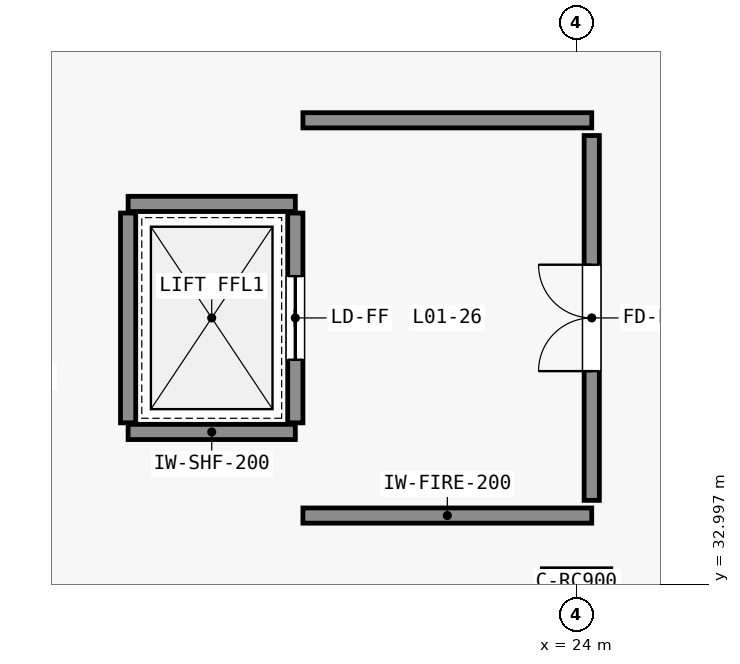
"""IFC4 building model, lengths in metres.
Left out: names, types, materials, properties, quantities, classifications, styles, units other than length and angle.
Written with IfcOpenShell. Run it as: python <this file> out.ifc"""

import sys

from ifc_helpers import new_model, si_unit, direction, frame, frame_2d, origin, origin_2d, place, context, subcontext, project, spatial, rectangle, extrude, element, fill, save


model = new_model("IFC4")
c1 = context("Model", 3, precision=1e-05, world=origin(), true_north=direction((0.0, 1.0)))
c2 = subcontext(c1, "Body", "Model", "MODEL_VIEW")
j1 = project(units=[si_unit("LENGTHUNIT", "METRE"), si_unit("PLANEANGLEUNIT", "RADIAN")], contexts=[c1])
p1 = place(None, origin())
s1 = spatial("IfcSite", under=j1, at=p1, CompositionType="ELEMENT")
p2 = place(p1, origin())
s2 = spatial("IfcBuilding", under=s1, at=p2, CompositionType="ELEMENT")
p3 = place(p2, frame((0.0, 0.0, 6.0)))
s3 = spatial("IfcBuildingStorey", under=s2, at=p3, CompositionType="ELEMENT", Elevation=6.0)
p4 = place(p3, frame((24.0, 32.6, 0.0), z_axis=(0.0, 0.0, 1.0), x_axis=(1.0, 0.0, 0.0)))
e1 = element("IfcColumn", 1, at=p4, inside=s3, PredefinedType="COLUMN", context=c2, shape_type="SweptSolid", body=[
    extrude(rectangle(XDim=0.9, YDim=1.2, at=origin_2d()), origin(), (0.0, 0.0, 1.0), 5.4),
])
for number, where, z_axis, x_axis in (
    (2, (18.1, 35.0, 0.0), (0.0, 0.0, 1.0), (1.0, 0.0, 0.0)),
    (3, (18.1, 38.0, 0.0), (0.0, 0.0, 1.0), (1.0, 0.0, 0.0)),
):
    element("IfcWall", number, at=place(p3, frame(where, z_axis=z_axis, x_axis=x_axis)), inside=s3, PredefinedType="STANDARD", context=c2, shape_type="SweptSolid", body=[
        extrude(rectangle(XDim=2.2, YDim=0.2, at=frame_2d((1.1, 0.0))), origin(), (0.0, 0.0, 1.0), 5.04),
    ])
p5 = place(p3, frame((18.1, 35.12, 0.0), z_axis=(0.0, 0.0, 1.0), x_axis=(0.0, 1.0, 0.0)))
e4 = element("IfcWall", 4, at=p5, inside=s3, PredefinedType="STANDARD", context=c2, shape_type="SweptSolid", body=[
    extrude(rectangle(XDim=2.76, YDim=0.2, at=frame_2d((1.38, 0.0))), origin(), (0.0, 0.0, 1.0), 5.04),
])
p6 = place(p3, frame((20.3, 35.12, 0.0), z_axis=(0.0, 0.0, 1.0), x_axis=(0.0, 1.0, 0.0)))
e5 = element("IfcWall", 5, at=p6, inside=s3, PredefinedType="STANDARD", context=c2, shape_type="SweptSolid", body=[
    extrude(rectangle(XDim=2.76, YDim=0.2, at=frame_2d((1.38, 0.0))), origin(), (0.0, 0.0, 1.0), 5.04),
])
p7 = place(p6, frame((0.83, 0.0, 0.0)))
e6 = element("IfcOpeningElement", 6, at=p7, cuts=e5, PredefinedType="OPENING", context=c2, shape_type="SweptSolid", body=[
    extrude(rectangle(XDim=1.1, YDim=2.15, at=frame_2d((0.55, 1.075))), frame((0.0, 0.11, 0.0), z_axis=(0.0, -1.0, 0.0), x_axis=(1.0, 0.0, 0.0)), (0.0, 0.0, 1.0), 0.22),
])
p8 = place(p3, frame((20.4, 33.9, 0.0), z_axis=(0.0, 0.0, 1.0), x_axis=(1.0, 0.0, 0.0)))
e7 = element("IfcWall", 7, at=p8, inside=s3, PredefinedType="STANDARD", context=c2, shape_type="SweptSolid", body=[
    extrude(rectangle(XDim=3.8, YDim=0.2, at=frame_2d((1.9, 0.0))), origin(), (0.0, 0.0, 1.0), 4.19),
])
p9 = place(p3, frame((20.4, 39.1, 0.0), z_axis=(0.0, 0.0, 1.0), x_axis=(1.0, 0.0, 0.0)))
e8 = element("IfcWall", 8, at=p9, inside=s3, PredefinedType="STANDARD", context=c2, shape_type="SweptSolid", body=[
    extrude(rectangle(XDim=3.8, YDim=0.2, at=frame_2d((1.9, 0.0))), origin(), (0.0, 0.0, 1.0), 2.775),
])
p10 = place(p3, frame((24.2, 34.1, 0.0), z_axis=(0.0, 0.0, 1.0), x_axis=(0.0, 1.0, 0.0)))
e9 = element("IfcWall", 9, at=p10, inside=s3, PredefinedType="STANDARD", context=c2, shape_type="SweptSolid", body=[
    extrude(rectangle(XDim=4.8, YDim=0.2, at=frame_2d((2.4, 0.0))), origin(), (0.0, 0.0, 1.0), 2.775),
])
p11 = place(p10, frame((1.7, 0.0, 0.0)))
e10 = element("IfcOpeningElement", 10, at=p11, cuts=e9, PredefinedType="OPENING", context=c2, shape_type="SweptSolid", body=[
    extrude(rectangle(XDim=1.4, YDim=2.2, at=frame_2d((0.7, 1.1))), frame((0.0, 0.11, 0.0), z_axis=(0.0, -1.0, 0.0), x_axis=(1.0, 0.0, 0.0)), (0.0, 0.0, 1.0), 0.22),
])
p12 = place(p7, origin())
e11 = element("IfcDoor", 11, at=p12, inside=s3, OperationType="SLIDING_TO_LEFT", PredefinedType="DOOR", context=c2, shape_type="SweptSolid", body=[
    extrude(rectangle(XDim=1.1, YDim=2.15, at=frame_2d((0.55, 1.075))), frame((0.0, 0.025, 0.0), z_axis=(0.0, -1.0, 0.0), x_axis=(1.0, 0.0, 0.0)), (0.0, 0.0, 1.0), 0.05),
])
fill(e6, e11)
p13 = place(p11, origin())
e12 = element("IfcDoor", 12, at=p13, inside=s3, OperationType="DOUBLE_DOOR_SINGLE_SWING", PredefinedType="DOOR", context=c2, shape_type="SweptSolid", body=[
    extrude(rectangle(XDim=1.4, YDim=2.2, at=frame_2d((0.7, 1.1))), frame((0.0, 0.025, 0.0), z_axis=(0.0, -1.0, 0.0), x_axis=(1.0, 0.0, 0.0)), (0.0, 0.0, 1.0), 0.05),
])
fill(e10, e12)
save(model, sys.argv[1])
